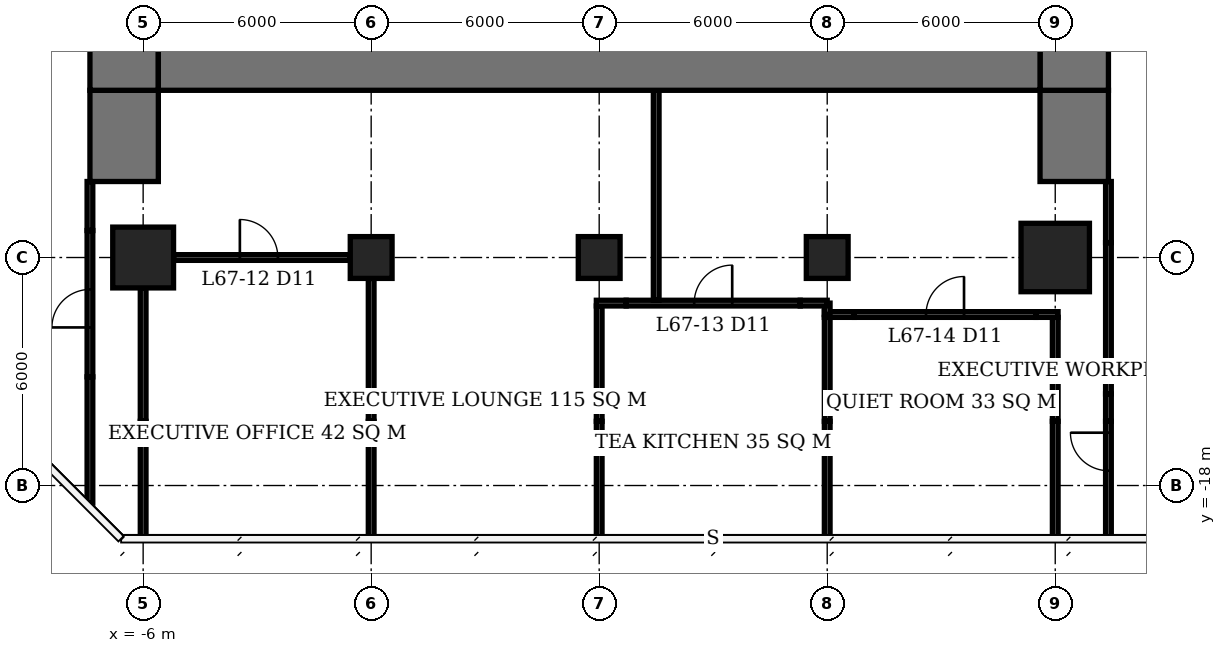
"""IFC4 building model, lengths in metres.
Left out: names, types, materials, properties, quantities, classifications, styles, units other than length and angle.
Written with IfcOpenShell. Run it as: python <this file> out.ifc"""

import sys

from ifc_helpers import new_model, si_unit, direction, frame, frame_2d, origin, origin_2d, place, context, subcontext, project, spatial, rectangle, extrude, element, fill, save


model = new_model("IFC4")
c1 = context("Model", 3, precision=1e-05, world=origin(), true_north=direction((0.0, 1.0)))
c2 = subcontext(c1, "Body", "Model", "MODEL_VIEW")
j1 = project(units=[si_unit("LENGTHUNIT", "METRE"), si_unit("PLANEANGLEUNIT", "RADIAN")], contexts=[c1])
p1 = place(None, origin())
s1 = spatial("IfcSite", under=j1, at=p1, CompositionType="ELEMENT")
p2 = place(p1, origin())
s2 = spatial("IfcBuilding", under=s1, at=p2, CompositionType="ELEMENT")
p3 = place(p2, frame((0.0, 0.0, 272.3)))
s3 = spatial("IfcBuildingStorey", under=s2, at=p3, CompositionType="ELEMENT", Elevation=272.3)
p4 = place(p3, frame((-6.0, -12.0, 0.0), z_axis=(0.0, 0.0, 1.0), x_axis=(1.0, 0.0, 0.0)))
e1 = element("IfcColumn", 1, at=p4, inside=s3, PredefinedType="COLUMN", context=c2, shape_type="SweptSolid", body=[
    extrude(rectangle(XDim=1.6, YDim=1.6, at=origin_2d()), origin(), (0.0, 0.0, 1.0), 3.9),
])
for number, where, z_axis, x_axis in (
    (2, (0.0, -12.0, 0.0), (0.0, 0.0, 1.0), (1.0, 0.0, 0.0)),
    (3, (6.0, -12.0, 0.0), (0.0, 0.0, 1.0), (1.0, 0.0, 0.0)),
    (4, (12.0, -12.0, 0.0), (0.0, 0.0, 1.0), (1.0, 0.0, 0.0)),
):
    element("IfcColumn", number, at=place(p3, frame(where, z_axis=z_axis, x_axis=x_axis)), inside=s3, PredefinedType="COLUMN", context=c2, shape_type="SweptSolid", body=[
        extrude(rectangle(XDim=1.1, YDim=1.1, at=origin_2d()), origin(), (0.0, 0.0, 1.0), 3.9),
    ])
p5 = place(p3, frame((18.0, -12.0, 0.0), z_axis=(0.0, 0.0, 1.0), x_axis=(1.0, 0.0, 0.0)))
e5 = element("IfcColumn", 5, at=p5, inside=s3, PredefinedType="COLUMN", context=c2, shape_type="SweptSolid", body=[
    extrude(rectangle(XDim=1.8, YDim=1.8, at=origin_2d()), origin(), (0.0, 0.0, 1.0), 3.9),
])
p6 = place(p3, frame((-5.6, -6.6, 0.0), z_axis=(0.0, 0.0, 1.0), x_axis=(1.0, 0.0, 0.0)))
e6 = element("IfcWall", 6, at=p6, inside=s3, PredefinedType="SHEAR", context=c2, shape_type="SweptSolid", body=[
    extrude(rectangle(XDim=23.2, YDim=2.0, at=frame_2d((11.6, 0.0))), origin(), (0.0, 0.0, 1.0), 3.9),
])
p7 = place(p3, frame((-6.5, -7.6, 0.0), z_axis=(0.0, 0.0, 1.0), x_axis=(0.0, 1.0, 0.0)))
e7 = element("IfcWall", 7, at=p7, inside=s3, PredefinedType="SHEAR", context=c2, shape_type="SweptSolid", body=[
    extrude(rectangle(XDim=21.2, YDim=1.8, at=frame_2d((10.6, 0.0))), origin(), (0.0, 0.0, 1.0), 3.9),
])
p8 = place(p7, frame((7.8, 0.0, 0.0)))
e8 = element("IfcOpeningElement", 8, at=p8, cuts=e7, PredefinedType="OPENING", context=c2, shape_type="SweptSolid", body=[
    extrude(rectangle(XDim=1.8, YDim=2.4, at=frame_2d((0.9, 1.2))), frame((0.0, 0.91, 0.0), z_axis=(0.0, -1.0, 0.0), x_axis=(1.0, 0.0, 0.0)), (0.0, 0.0, 1.0), 1.82),
])
p9 = place(p3, frame((18.5, -7.6, 0.0), z_axis=(0.0, 0.0, 1.0), x_axis=(0.0, 1.0, 0.0)))
e9 = element("IfcWall", 9, at=p9, inside=s3, PredefinedType="SHEAR", context=c2, shape_type="SweptSolid", body=[
    extrude(rectangle(XDim=21.2, YDim=1.8, at=frame_2d((10.6, 0.0))), origin(), (0.0, 0.0, 1.0), 3.9),
])
p10 = place(p9, frame((9.2, 0.0, 0.0)))
e10 = element("IfcOpeningElement", 10, at=p10, cuts=e9, PredefinedType="OPENING", context=c2, shape_type="SweptSolid", body=[
    extrude(rectangle(XDim=1.8, YDim=2.4, at=frame_2d((0.9, 1.2))), frame((0.0, 0.91, 0.0), z_axis=(0.0, -1.0, 0.0), x_axis=(1.0, 0.0, 0.0)), (0.0, 0.0, 1.0), 1.82),
])
for number, where, z_axis, x_axis in (
    (11, (-6.5, -10.0, 0.0), (0.0, 0.0, 1.0), (0.0, 1.0, 0.0)),
    (12, (18.5, -10.0, 0.0), (0.0, 0.0, 1.0), (0.0, 1.0, 0.0)),
):
    element("IfcWall", number, at=place(p3, frame(where, z_axis=z_axis, x_axis=x_axis)), inside=s3, PredefinedType="SHEAR", context=c2, shape_type="SweptSolid", body=[
        extrude(rectangle(XDim=2.4, YDim=1.8, at=frame_2d((1.2, 0.0))), origin(), (0.0, 0.0, 1.0), 3.9),
    ])
p11 = place(p3, frame((11.925, -13.5, 0.0), z_axis=(0.0, 0.0, 1.0), x_axis=(1.0, 0.0, 0.0)))
e13 = element("IfcWall", 13, at=p11, inside=s3, PredefinedType="PARTITIONING", context=c2, shape_type="SweptSolid", body=[
    extrude(rectangle(XDim=0.785, YDim=0.15, at=frame_2d((0.393, 0.0))), origin(), (0.0, 0.0, 1.0), 2.65),
])
p12 = place(p3, frame((12.71, -13.5, 0.0), z_axis=(0.0, 0.0, 1.0), x_axis=(1.0, 0.0, 0.0)))
e14 = element("IfcWall", 14, at=p12, inside=s3, PredefinedType="PARTITIONING", context=c2, shape_type="SweptSolid", body=[
    extrude(rectangle(XDim=4.78, YDim=0.15, at=frame_2d((2.39, 0.0))), origin(), (0.0, 0.0, 1.0), 3.65),
])
p13 = place(p12, frame((1.89, 0.0, 0.0)))
e15 = element("IfcOpeningElement", 15, at=p13, cuts=e14, PredefinedType="OPENING", context=c2, shape_type="SweptSolid", body=[
    extrude(rectangle(XDim=1.0, YDim=2.4, at=frame_2d((0.5, 1.2))), frame((0.0, 0.085, 0.0), z_axis=(0.0, -1.0, 0.0), x_axis=(1.0, 0.0, 0.0)), (0.0, 0.0, 1.0), 0.17),
])
p14 = place(p3, frame((17.49, -13.5, 0.0), z_axis=(0.0, 0.0, 1.0), x_axis=(1.0, 0.0, 0.0)))
e16 = element("IfcWall", 16, at=p14, inside=s3, PredefinedType="PARTITIONING", context=c2, shape_type="SweptSolid", body=[
    extrude(rectangle(XDim=0.585, YDim=0.15, at=frame_2d((0.292, 0.0))), origin(), (0.0, 0.0, 1.0), 2.65),
])
p15 = place(p3, frame((5.925, -13.2, 0.0), z_axis=(0.0, 0.0, 1.0), x_axis=(1.0, 0.0, 0.0)))
e17 = element("IfcWall", 17, at=p15, inside=s3, PredefinedType="PARTITIONING", context=c2, shape_type="SweptSolid", body=[
    extrude(rectangle(XDim=0.785, YDim=0.15, at=frame_2d((0.393, 0.0))), origin(), (0.0, 0.0, 1.0), 2.65),
])
p16 = place(p3, frame((6.71, -13.2, 0.0), z_axis=(0.0, 0.0, 1.0), x_axis=(1.0, 0.0, 0.0)))
e18 = element("IfcWall", 18, at=p16, inside=s3, PredefinedType="PARTITIONING", context=c2, shape_type="SweptSolid", body=[
    extrude(rectangle(XDim=4.58, YDim=0.15, at=frame_2d((2.29, 0.0))), origin(), (0.0, 0.0, 1.0), 3.65),
])
p17 = place(p16, frame((1.79, 0.0, 0.0)))
e19 = element("IfcOpeningElement", 19, at=p17, cuts=e18, PredefinedType="OPENING", context=c2, shape_type="SweptSolid", body=[
    extrude(rectangle(XDim=1.0, YDim=2.4, at=frame_2d((0.5, 1.2))), frame((0.0, 0.085, 0.0), z_axis=(0.0, -1.0, 0.0), x_axis=(1.0, 0.0, 0.0)), (0.0, 0.0, 1.0), 0.17),
])
p18 = place(p3, frame((11.29, -13.2, 0.0), z_axis=(0.0, 0.0, 1.0), x_axis=(1.0, 0.0, 0.0)))
e20 = element("IfcWall", 20, at=p18, inside=s3, PredefinedType="PARTITIONING", context=c2, shape_type="SweptSolid", body=[
    extrude(rectangle(XDim=0.71, YDim=0.15, at=frame_2d((0.355, 0.0))), origin(), (0.0, 0.0, 1.0), 2.65),
])
p19 = place(p3, frame((-5.2, -12.0, 0.0), z_axis=(0.0, 0.0, 1.0), x_axis=(1.0, 0.0, 0.0)))
e21 = element("IfcWall", 21, at=p19, inside=s3, PredefinedType="PARTITIONING", context=c2, shape_type="SweptSolid", body=[
    extrude(rectangle(XDim=4.64, YDim=0.15, at=frame_2d((2.32, 0.0))), origin(), (0.0, 0.0, 1.0), 3.65),
])
p20 = place(p19, frame((1.745, 0.0, 0.0)))
e22 = element("IfcOpeningElement", 22, at=p20, cuts=e21, PredefinedType="OPENING", context=c2, shape_type="SweptSolid", body=[
    extrude(rectangle(XDim=1.0, YDim=2.4, at=frame_2d((0.5, 1.2))), frame((0.0, 0.085, 0.0), z_axis=(0.0, -1.0, 0.0), x_axis=(1.0, 0.0, 0.0)), (0.0, 0.0, 1.0), 0.17),
])
p21 = place(p3, frame((-6.0, -19.375, 0.0), z_axis=(0.0, 0.0, 1.0), x_axis=(0.0, 1.0, 0.0)))
e23 = element("IfcWall", 23, at=p21, inside=s3, PredefinedType="PARTITIONING", context=c2, shape_type="SweptSolid", body=[
    extrude(rectangle(XDim=3.065, YDim=0.15, at=frame_2d((1.532, 0.0))), origin(), (0.0, 0.0, 1.0), 3.65),
])
p22 = place(p3, frame((-6.0, -16.31, 0.0), z_axis=(0.0, 0.0, 1.0), x_axis=(0.0, 1.0, 0.0)))
e24 = element("IfcWall", 24, at=p22, inside=s3, PredefinedType="PARTITIONING", context=c2, shape_type="SweptSolid", body=[
    extrude(rectangle(XDim=3.51, YDim=0.15, at=frame_2d((1.755, 0.0))), origin(), (0.0, 0.0, 1.0), 2.65),
])
p23 = place(p3, frame((0.0, -19.375, 0.0), z_axis=(0.0, 0.0, 1.0), x_axis=(0.0, 1.0, 0.0)))
e25 = element("IfcWall", 25, at=p23, inside=s3, PredefinedType="PARTITIONING", context=c2, shape_type="SweptSolid", body=[
    extrude(rectangle(XDim=3.065, YDim=0.15, at=frame_2d((1.532, 0.0))), origin(), (0.0, 0.0, 1.0), 3.65),
])
p24 = place(p3, frame((0.0, -16.31, 0.0), z_axis=(0.0, 0.0, 1.0), x_axis=(0.0, 1.0, 0.0)))
e26 = element("IfcWall", 26, at=p24, inside=s3, PredefinedType="PARTITIONING", context=c2, shape_type="SweptSolid", body=[
    extrude(rectangle(XDim=3.76, YDim=0.15, at=frame_2d((1.88, 0.0))), origin(), (0.0, 0.0, 1.0), 2.65),
])
p25 = place(p3, frame((6.0, -19.35, 0.0), z_axis=(0.0, 0.0, 1.0), x_axis=(0.0, 1.0, 0.0)))
e27 = element("IfcWall", 27, at=p25, inside=s3, PredefinedType="PARTITIONING", context=c2, shape_type="SweptSolid", body=[
    extrude(rectangle(XDim=3.04, YDim=0.15, at=frame_2d((1.52, 0.0))), origin(), (0.0, 0.0, 1.0), 3.65),
])
p26 = place(p3, frame((6.0, -16.31, 0.0), z_axis=(0.0, 0.0, 1.0), x_axis=(0.0, 1.0, 0.0)))
e28 = element("IfcWall", 28, at=p26, inside=s3, PredefinedType="PARTITIONING", context=c2, shape_type="SweptSolid", body=[
    extrude(rectangle(XDim=3.035, YDim=0.15, at=frame_2d((1.518, 0.0))), origin(), (0.0, 0.0, 1.0), 2.65),
])
p27 = place(p3, frame((12.0, -19.35, 0.0), z_axis=(0.0, 0.0, 1.0), x_axis=(0.0, 1.0, 0.0)))
e29 = element("IfcWall", 29, at=p27, inside=s3, PredefinedType="PARTITIONING", context=c2, shape_type="SweptSolid", body=[
    extrude(rectangle(XDim=3.04, YDim=0.15, at=frame_2d((1.52, 0.0))), origin(), (0.0, 0.0, 1.0), 3.65),
])
p28 = place(p3, frame((12.0, -16.31, 0.0), z_axis=(0.0, 0.0, 1.0), x_axis=(0.0, 1.0, 0.0)))
e30 = element("IfcWall", 30, at=p28, inside=s3, PredefinedType="PARTITIONING", context=c2, shape_type="SweptSolid", body=[
    extrude(rectangle(XDim=2.735, YDim=0.15, at=frame_2d((1.368, 0.0))), origin(), (0.0, 0.0, 1.0), 2.65),
])
p29 = place(p3, frame((12.0, -13.5, 0.0), z_axis=(0.0, 0.0, 1.0), x_axis=(0.0, 1.0, 0.0)))
e31 = element("IfcWall", 31, at=p29, inside=s3, PredefinedType="PARTITIONING", context=c2, shape_type="SweptSolid", body=[
    extrude(rectangle(XDim=0.3, YDim=0.15, at=frame_2d((0.15, 0.0))), origin(), (0.0, 0.0, 1.0), 2.65),
])
p30 = place(p3, frame((18.0, -19.375, 0.0), z_axis=(0.0, 0.0, 1.0), x_axis=(0.0, 1.0, 0.0)))
e32 = element("IfcWall", 32, at=p30, inside=s3, PredefinedType="PARTITIONING", context=c2, shape_type="SweptSolid", body=[
    extrude(rectangle(XDim=3.065, YDim=0.15, at=frame_2d((1.532, 0.0))), origin(), (0.0, 0.0, 1.0), 3.65),
])
p31 = place(p3, frame((18.0, -16.31, 0.0), z_axis=(0.0, 0.0, 1.0), x_axis=(0.0, 1.0, 0.0)))
e33 = element("IfcWall", 33, at=p31, inside=s3, PredefinedType="PARTITIONING", context=c2, shape_type="SweptSolid", body=[
    extrude(rectangle(XDim=2.735, YDim=0.15, at=frame_2d((1.368, 0.0))), origin(), (0.0, 0.0, 1.0), 2.65),
])
p32 = place(p3, frame((-7.4, -18.464, 0.0), z_axis=(0.0, 0.0, 1.0), x_axis=(0.0, 1.0, 0.0)))
e34 = element("IfcWall", 34, at=p32, inside=s3, PredefinedType="PARTITIONING", context=c2, shape_type="SweptSolid", body=[
    extrude(rectangle(XDim=3.324, YDim=0.15, at=frame_2d((1.662, 0.0))), origin(), (0.0, 0.0, 1.0), 3.65),
])
p33 = place(p3, frame((-7.4, -15.14, 0.0), z_axis=(0.0, 0.0, 1.0), x_axis=(0.0, 1.0, 0.0)))
e35 = element("IfcWall", 35, at=p33, inside=s3, PredefinedType="PARTITIONING", context=c2, shape_type="SweptSolid", body=[
    extrude(rectangle(XDim=3.85, YDim=0.15, at=frame_2d((1.925, 0.0))), origin(), (0.0, 0.0, 1.0), 2.65),
])
p34 = place(p33, frame((1.3, 0.0, 0.0)))
e36 = element("IfcOpeningElement", 36, at=p34, cuts=e35, PredefinedType="OPENING", context=c2, shape_type="SweptSolid", body=[
    extrude(rectangle(XDim=1.0, YDim=2.1, at=frame_2d((0.5, 1.05))), frame((0.0, 0.085, 0.0), z_axis=(0.0, -1.0, 0.0), x_axis=(1.0, 0.0, 0.0)), (0.0, 0.0, 1.0), 0.17),
])
p35 = place(p3, frame((-7.4, -11.29, 0.0), z_axis=(0.0, 0.0, 1.0), x_axis=(0.0, 1.0, 0.0)))
e37 = element("IfcWall", 37, at=p35, inside=s3, PredefinedType="PARTITIONING", context=c2, shape_type="SweptSolid", body=[
    extrude(rectangle(XDim=1.29, YDim=0.15, at=frame_2d((0.645, 0.0))), origin(), (0.0, 0.0, 1.0), 3.65),
])
p36 = place(p3, frame((7.5, -13.125, 0.0), z_axis=(0.0, 0.0, 1.0), x_axis=(0.0, 1.0, 0.0)))
e38 = element("IfcWall", 38, at=p36, inside=s3, PredefinedType="PARTITIONING", context=c2, shape_type="SweptSolid", body=[
    extrude(rectangle(XDim=5.525, YDim=0.15, at=frame_2d((2.762, 0.0))), origin(), (0.0, 0.0, 1.0), 3.65),
])
p37 = place(p3, frame((19.4, -19.375, 0.0), z_axis=(0.0, 0.0, 1.0), x_axis=(0.0, 1.0, 0.0)))
e39 = element("IfcWall", 39, at=p37, inside=s3, PredefinedType="PARTITIONING", context=c2, shape_type="SweptSolid", body=[
    extrude(rectangle(XDim=3.065, YDim=0.15, at=frame_2d((1.532, 0.0))), origin(), (0.0, 0.0, 1.0), 3.65),
])
p38 = place(p37, frame((1.765, 0.0, 0.0)))
e40 = element("IfcOpeningElement", 40, at=p38, cuts=e39, PredefinedType="OPENING", context=c2, shape_type="SweptSolid", body=[
    extrude(rectangle(XDim=1.0, YDim=2.4, at=frame_2d((0.5, 1.2))), frame((0.0, 0.085, 0.0), z_axis=(0.0, -1.0, 0.0), x_axis=(1.0, 0.0, 0.0)), (0.0, 0.0, 1.0), 0.17),
])
p39 = place(p3, frame((19.4, -16.31, 0.0), z_axis=(0.0, 0.0, 1.0), x_axis=(0.0, 1.0, 0.0)))
e41 = element("IfcWall", 41, at=p39, inside=s3, PredefinedType="PARTITIONING", context=c2, shape_type="SweptSolid", body=[
    extrude(rectangle(XDim=0.72, YDim=0.15, at=frame_2d((0.36, 0.0))), origin(), (0.0, 0.0, 1.0), 2.65),
])
p40 = place(p3, frame((19.4, -15.59, 0.0), z_axis=(0.0, 0.0, 1.0), x_axis=(0.0, 1.0, 0.0)))
e42 = element("IfcWall", 42, at=p40, inside=s3, PredefinedType="PARTITIONING", context=c2, shape_type="SweptSolid", body=[
    extrude(rectangle(XDim=0.398, YDim=0.15, at=frame_2d((0.199, 0.0))), origin(), (0.0, 0.0, 1.0), 3.65),
])
p41 = place(p3, frame((19.4, -15.192, 0.0), z_axis=(0.0, 0.0, 1.0), x_axis=(0.0, 1.0, 0.0)))
e43 = element("IfcWall", 43, at=p41, inside=s3, PredefinedType="PARTITIONING", context=c2, shape_type="SweptSolid", body=[
    extrude(rectangle(XDim=3.584, YDim=0.15, at=frame_2d((1.792, 0.0))), origin(), (0.0, 0.0, 1.0), 2.65),
])
p42 = place(p3, frame((19.4, -11.608, 0.0), z_axis=(0.0, 0.0, 1.0), x_axis=(0.0, 1.0, 0.0)))
e44 = element("IfcWall", 44, at=p42, inside=s3, PredefinedType="PARTITIONING", context=c2, shape_type="SweptSolid", body=[
    extrude(rectangle(XDim=1.608, YDim=0.15, at=frame_2d((0.804, 0.0))), origin(), (0.0, 0.0, 1.0), 3.65),
])
p43 = place(p20, origin())
e45 = element("IfcDoor", 45, at=p43, inside=s3, OperationType="SINGLE_SWING_LEFT", PredefinedType="DOOR", context=c2, shape_type="SweptSolid", body=[
    extrude(rectangle(XDim=1.0, YDim=2.4, at=frame_2d((0.5, 1.2))), frame((0.0, 0.025, 0.0), z_axis=(0.0, -1.0, 0.0), x_axis=(1.0, 0.0, 0.0)), (0.0, 0.0, 1.0), 0.05),
])
fill(e22, e45)
p44 = place(p17, origin())
e46 = element("IfcDoor", 46, at=p44, inside=s3, OperationType="SINGLE_SWING_RIGHT", PredefinedType="DOOR", context=c2, shape_type="SweptSolid", body=[
    extrude(rectangle(XDim=1.0, YDim=2.4, at=frame_2d((0.5, 1.2))), frame((0.0, 0.025, 0.0), z_axis=(0.0, -1.0, 0.0), x_axis=(1.0, 0.0, 0.0)), (0.0, 0.0, 1.0), 0.05),
])
fill(e19, e46)
p45 = place(p13, origin())
e47 = element("IfcDoor", 47, at=p45, inside=s3, OperationType="SINGLE_SWING_RIGHT", PredefinedType="DOOR", context=c2, shape_type="SweptSolid", body=[
    extrude(rectangle(XDim=1.0, YDim=2.4, at=frame_2d((0.5, 1.2))), frame((0.0, 0.025, 0.0), z_axis=(0.0, -1.0, 0.0), x_axis=(1.0, 0.0, 0.0)), (0.0, 0.0, 1.0), 0.05),
])
fill(e15, e47)
p46 = place(p38, origin())
e48 = element("IfcDoor", 48, at=p46, inside=s3, OperationType="SINGLE_SWING_RIGHT", PredefinedType="DOOR", context=c2, shape_type="SweptSolid", body=[
    extrude(rectangle(XDim=1.0, YDim=2.4, at=frame_2d((0.5, 1.2))), frame((0.0, 0.025, 0.0), z_axis=(0.0, -1.0, 0.0), x_axis=(1.0, 0.0, 0.0)), (0.0, 0.0, 1.0), 0.05),
])
fill(e40, e48)
p47 = place(p34, origin())
e49 = element("IfcDoor", 49, at=p47, inside=s3, OperationType="SINGLE_SWING_LEFT", PredefinedType="DOOR", context=c2, shape_type="SweptSolid", body=[
    extrude(rectangle(XDim=1.0, YDim=2.1, at=frame_2d((0.5, 1.05))), frame((0.0, 0.025, 0.0), z_axis=(0.0, -1.0, 0.0), x_axis=(1.0, 0.0, 0.0)), (0.0, 0.0, 1.0), 0.05),
])
fill(e36, e49)
save(model, sys.argv[1])
